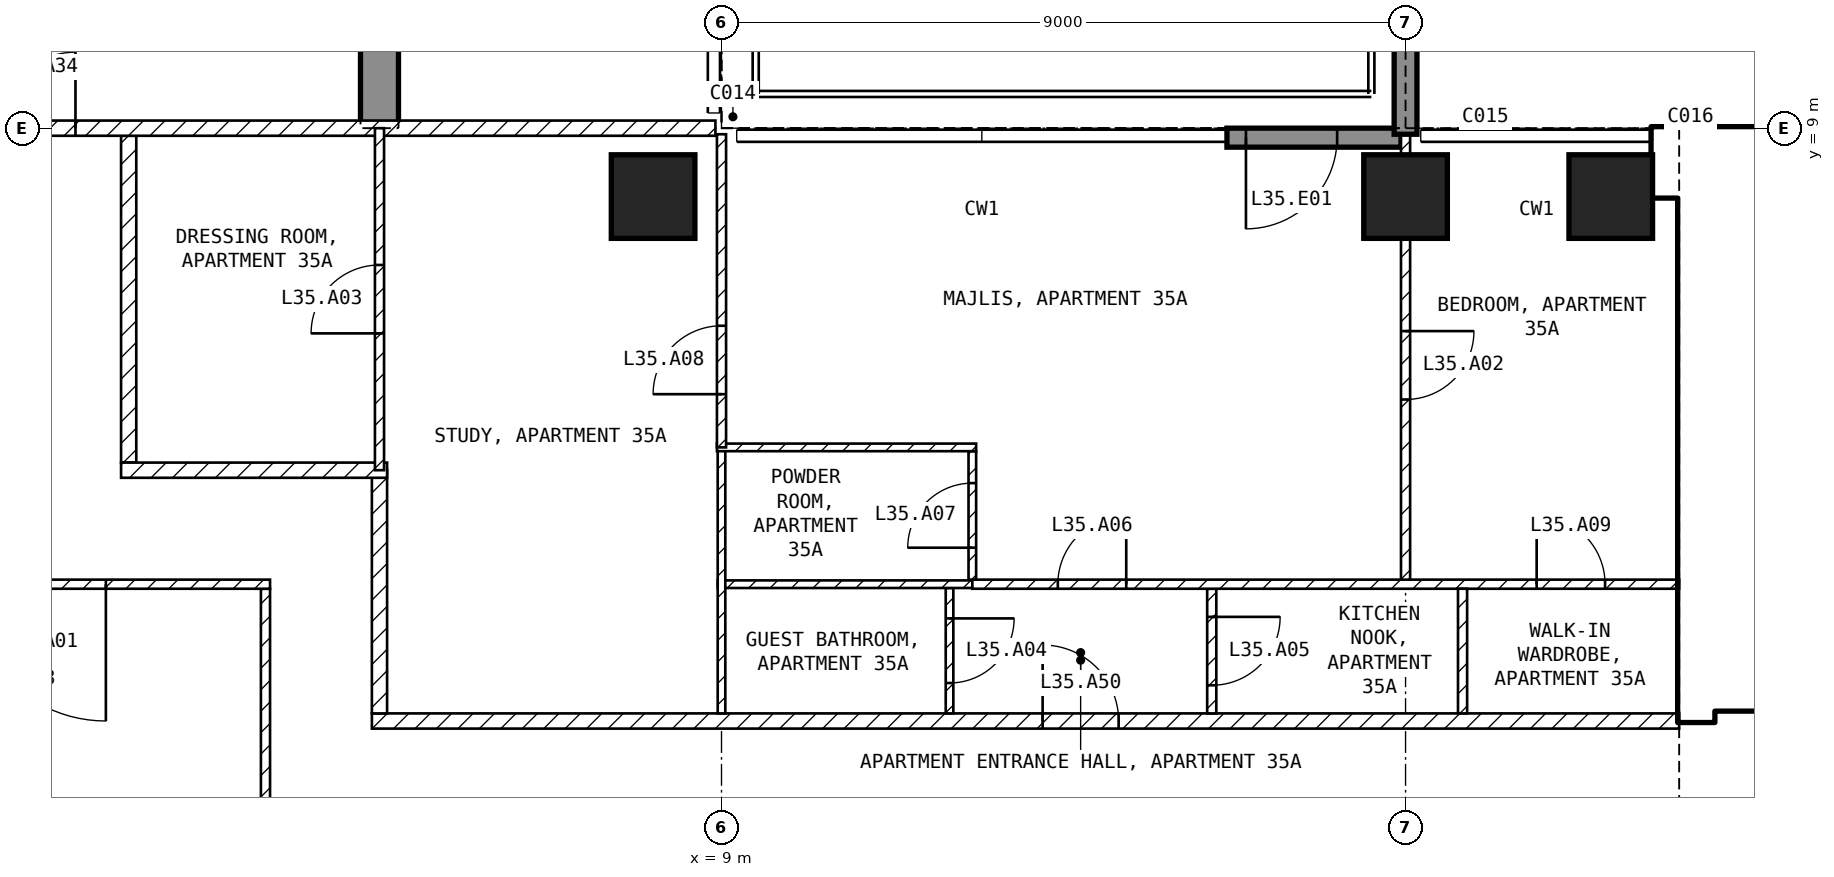
"""IFC4 building model, lengths in metres.
Left out: names, types, materials, properties, quantities, classifications, styles, units other than length and angle.
Written with IfcOpenShell. Run it as: python <this file> out.ifc"""

import sys

from ifc_helpers import new_model, si_unit, direction, frame, frame_2d, origin, origin_2d, place, context, subcontext, project, spatial, polyline, rectangle, outline, extrude, element, fill, save


model = new_model("IFC4")
c1 = context("Model", 3, precision=1e-05, world=origin(), true_north=direction((0.0, 1.0)))
c2 = subcontext(c1, "Body", "Model", "MODEL_VIEW")
j1 = project(units=[si_unit("LENGTHUNIT", "METRE"), si_unit("PLANEANGLEUNIT", "RADIAN")], contexts=[c1])
p1 = place(None, origin())
s1 = spatial("IfcSite", under=j1, at=p1, CompositionType="ELEMENT")
p2 = place(p1, origin())
s2 = spatial("IfcBuilding", under=s1, at=p2, CompositionType="ELEMENT")
p3 = place(p2, frame((0.0, 0.0, 144.4)))
s3 = spatial("IfcBuildingStorey", under=s2, at=p3, CompositionType="ELEMENT", Elevation=144.4)
for number, where, z_axis, x_axis in (
    (1, (8.1, 8.1, -0.25), (0.0, 0.0, 1.0), (1.0, 0.0, 0.0)),
    (2, (18.0, 8.1, -0.25), (0.0, 0.0, 1.0), (1.0, 0.0, 0.0)),
    (3, (20.7, 8.1, -0.25), (0.0, 0.0, 1.0), (1.0, 0.0, 0.0)),
):
    element("IfcColumn", number, at=place(p3, frame(where, z_axis=z_axis, x_axis=x_axis)), inside=s3, PredefinedType="COLUMN", context=c2, shape_type="SweptSolid", body=[
        extrude(rectangle(XDim=1.1, YDim=1.1, at=origin_2d()), origin(), (0.0, 0.0, 1.0), 3.5),
    ])
p4 = place(p3, frame((4.25, 9.0, -0.25), z_axis=(1.0, 0.0, 0.0), x_axis=(0.0, 1.0, 0.0)))
e4 = element("IfcWall", 4, at=p4, inside=s3, PredefinedType="SHEAR", context=c2, shape_type="SweptSolid", body=[
    extrude(outline(polyline([(0.0, 0.0), (2.1, 0.0), (2.1, 2.65), (4.5, 2.65), (4.5, 0.0), (9.9, 0.0), (9.9, 2.65), (12.3, 2.65), (12.3, 0.0), (16.55, 0.0), (16.55, 3.5), (0.0, 3.5), (0.0, 0.0)])), origin(), (0.0, 0.0, 1.0), 0.5),
])
p5 = place(p3, frame((17.94, 8.875, 0.0), z_axis=(0.0, 0.0, 1.0), x_axis=(-1.0, 0.0, 0.0)))
e5 = element("IfcWall", 5, at=p5, inside=s3, PredefinedType="SOLIDWALL", context=c2, shape_type="SweptSolid", body=[
    extrude(rectangle(XDim=2.29, YDim=0.25, at=frame_2d((1.145, 0.0))), origin(), (0.0, 0.0, 1.0), 3.25),
])
p6 = place(p5, frame((0.84, 0.0, 0.0)))
e6 = element("IfcOpeningElement", 6, at=p6, cuts=e5, PredefinedType="OPENING", context=c2, shape_type="SweptSolid", body=[
    extrude(rectangle(XDim=1.2, YDim=2.4, at=frame_2d((0.6, 1.2))), frame((0.0, 0.135, 0.0), z_axis=(0.0, -1.0, 0.0), x_axis=(1.0, 0.0, 0.0)), (0.0, 0.0, 1.0), 0.27),
])
p7 = place(p3, frame((18.0, 8.92, 0.0), z_axis=(0.0, 0.0, 1.0), x_axis=(0.0, 1.0, 0.0)))
e7 = element("IfcWall", 7, at=p7, inside=s3, PredefinedType="SOLIDWALL", context=c2, shape_type="SweptSolid", body=[
    extrude(rectangle(XDim=2.82, YDim=0.3, at=frame_2d((1.41, 0.0))), origin(), (0.0, 0.0, 1.0), 3.25),
])
p8 = place(p3, frame((21.25, 8.55, 0.0), z_axis=(0.0, 0.0, 1.0), x_axis=(1.0, 0.0, 0.0)))
e8 = element("IfcWall", 8, at=p8, inside=s3, PredefinedType="SHEAR", context=c2, shape_type="SweptSolid", body=[
    extrude(rectangle(XDim=8.2, YDim=0.9, at=frame_2d((4.1, 0.0))), origin(), (0.0, 0.0, 1.0), 3.25),
])
p9 = place(p3, frame((21.825, 1.2, 0.0), z_axis=(0.0, 0.0, 1.0), x_axis=(0.0, 1.0, 0.0)))
e9 = element("IfcWall", 9, at=p9, inside=s3, PredefinedType="SHEAR", context=c2, shape_type="SweptSolid", body=[
    extrude(rectangle(XDim=6.9, YDim=0.45, at=frame_2d((3.45, 0.0))), origin(), (0.0, 0.0, 1.0), 3.25),
])
p10 = place(p3, frame((22.05, 1.45, 0.0), z_axis=(0.0, 0.0, 1.0), x_axis=(1.0, 0.0, 0.0)))
e10 = element("IfcWall", 10, at=p10, inside=s3, PredefinedType="SOLIDWALL", context=c2, shape_type="SweptSolid", body=[
    extrude(rectangle(XDim=11.0, YDim=0.2, at=frame_2d((5.5, 0.0))), origin(), (0.0, 0.0, 1.0), 3.25),
])
p11 = place(p10, frame((0.75, 0.0, 0.0)))
e11 = element("IfcOpeningElement", 11, at=p11, cuts=e10, PredefinedType="OPENING", context=c2, shape_type="SweptSolid", body=[
    extrude(rectangle(XDim=1.0, YDim=2.1, at=frame_2d((0.5, 1.05))), frame((0.0, 0.11, 0.0), z_axis=(0.0, -1.0, 0.0), x_axis=(1.0, 0.0, 0.0)), (0.0, 0.0, 1.0), 0.22),
])
p12 = place(p10, frame((3.25, 0.0, 0.0)))
e12 = element("IfcOpeningElement", 12, at=p12, cuts=e10, PredefinedType="OPENING", context=c2, shape_type="SweptSolid", body=[
    extrude(rectangle(XDim=1.0, YDim=2.1, at=frame_2d((0.5, 1.05))), frame((0.0, 0.11, 0.0), z_axis=(0.0, -1.0, 0.0), x_axis=(1.0, 0.0, 0.0)), (0.0, 0.0, 1.0), 0.22),
])
p13 = place(p10, frame((9.075, 0.0, 0.0)))
e13 = element("IfcOpeningElement", 13, at=p13, cuts=e10, PredefinedType="OPENING", context=c2, shape_type="SweptSolid", body=[
    extrude(rectangle(XDim=0.9, YDim=2.1, at=frame_2d((0.45, 1.05))), frame((0.0, 0.11, 0.0), z_axis=(0.0, -1.0, 0.0), x_axis=(1.0, 0.0, 0.0)), (0.0, 0.0, 1.0), 0.22),
])
p14 = place(p3, frame((22.05, 5.15, 0.0), z_axis=(0.0, 0.0, 1.0), x_axis=(1.0, 0.0, 0.0)))
e14 = element("IfcWall", 14, at=p14, inside=s3, PredefinedType="SOLIDWALL", context=c2, shape_type="SweptSolid", body=[
    extrude(rectangle(XDim=6.3, YDim=0.2, at=frame_2d((3.15, 0.0))), origin(), (0.0, 0.0, 1.0), 3.25),
])
p15 = place(p14, frame((0.2, 0.0, 0.0)))
e15 = element("IfcOpeningElement", 15, at=p15, cuts=e14, PredefinedType="OPENING", context=c2, shape_type="SweptSolid", body=[
    extrude(rectangle(XDim=1.0, YDim=2.1, at=frame_2d((0.5, 1.05))), frame((0.0, 0.11, 0.0), z_axis=(0.0, -1.0, 0.0), x_axis=(1.0, 0.0, 0.0)), (0.0, 0.0, 1.0), 0.22),
])
p16 = place(p3, frame((3.0, -2.94, 0.0), z_axis=(0.0, 0.0, 1.0), x_axis=(0.0, 1.0, 0.0)))
e16 = element("IfcWall", 16, at=p16, inside=s3, PredefinedType="PARTITIONING", context=c2, shape_type="SweptSolid", body=[
    extrude(rectangle(XDim=5.88, YDim=0.12, at=frame_2d((2.94, 0.0))), origin(), (0.0, 0.0, 1.0), 3.25),
])
p17 = place(p3, frame((3.06, 3.0, 0.0), z_axis=(0.0, 0.0, 1.0), x_axis=(-1.0, 0.0, 0.0)))
e17 = element("IfcWall", 17, at=p17, inside=s3, PredefinedType="PARTITIONING", context=c2, shape_type="SweptSolid", body=[
    extrude(rectangle(XDim=6.12, YDim=0.12, at=frame_2d((3.06, 0.0))), origin(), (0.0, 0.0, 1.0), 3.25),
])
p18 = place(p17, frame((2.16, 0.0, 0.0)))
e18 = element("IfcOpeningElement", 18, at=p18, cuts=e17, PredefinedType="OPENING", context=c2, shape_type="SweptSolid", body=[
    extrude(rectangle(XDim=1.8, YDim=2.1, at=frame_2d((0.9, 1.05))), frame((0.0, 0.07, 0.0), z_axis=(0.0, -1.0, 0.0), x_axis=(1.0, 0.0, 0.0)), (0.0, 0.0, 1.0), 0.14),
])
p19 = place(p3, frame((4.4, 1.2, 0.0), z_axis=(0.0, 0.0, 1.0), x_axis=(1.0, 0.0, 0.0)))
e19 = element("IfcWall", 19, at=p19, inside=s3, PredefinedType="PARTITIONING", context=c2, shape_type="SweptSolid", body=[
    extrude(rectangle(XDim=17.2, YDim=0.2, at=frame_2d((8.6, 0.0))), origin(), (0.0, 0.0, 1.0), 3.25),
])
p20 = place(p19, frame((8.825, 0.0, 0.0)))
e20 = element("IfcOpeningElement", 20, at=p20, cuts=e19, PredefinedType="OPENING", context=c2, shape_type="SweptSolid", body=[
    extrude(rectangle(XDim=1.0, YDim=2.1, at=frame_2d((0.5, 1.05))), frame((0.0, 0.11, 0.0), z_axis=(0.0, -1.0, 0.0), x_axis=(1.0, 0.0, 0.0)), (0.0, 0.0, 1.0), 0.22),
])
p21 = place(p3, frame((4.5, 4.5, 0.0), z_axis=(0.0, 0.0, 1.0), x_axis=(0.0, -1.0, 0.0)))
e21 = element("IfcWall", 21, at=p21, inside=s3, PredefinedType="PARTITIONING", context=c2, shape_type="SweptSolid", body=[
    extrude(rectangle(XDim=3.2, YDim=0.2, at=frame_2d((1.6, 0.0))), origin(), (0.0, 0.0, 1.0), 3.25),
])
p22 = place(p3, frame((1.2, 8.9, 0.0), z_axis=(0.0, 0.0, 1.0), x_axis=(0.0, -1.0, 0.0)))
e22 = element("IfcWall", 22, at=p22, inside=s3, PredefinedType="PARTITIONING", context=c2, shape_type="SweptSolid", body=[
    extrude(rectangle(XDim=4.3, YDim=0.2, at=frame_2d((2.15, 0.0))), origin(), (0.0, 0.0, 1.0), 3.25),
])
p23 = place(p3, frame((1.1, 4.5, 0.0), z_axis=(0.0, 0.0, 1.0), x_axis=(1.0, 0.0, 0.0)))
e23 = element("IfcWall", 23, at=p23, inside=s3, PredefinedType="PARTITIONING", context=c2, shape_type="SweptSolid", body=[
    extrude(rectangle(XDim=3.5, YDim=0.2, at=frame_2d((1.75, 0.0))), origin(), (0.0, 0.0, 1.0), 3.25),
])
p24 = place(p3, frame((-8.92, 9.0, 0.0), z_axis=(0.0, 0.0, 1.0), x_axis=(1.0, 0.0, 0.0)))
e24 = element("IfcWall", 24, at=p24, inside=s3, PredefinedType="PARTITIONING", context=c2, shape_type="SweptSolid", body=[
    extrude(rectangle(XDim=17.84, YDim=0.2, at=frame_2d((8.92, 0.0))), origin(), (0.0, 0.0, 1.0), 3.25),
])
p25 = place(p24, frame((8.42, 0.0, 0.0)))
e25 = element("IfcOpeningElement", 25, at=p25, cuts=e24, PredefinedType="OPENING", context=c2, shape_type="SweptSolid", body=[
    extrude(rectangle(XDim=1.0, YDim=2.1, at=frame_2d((0.5, 1.05))), frame((0.0, 0.11, 0.0), z_axis=(0.0, -1.0, 0.0), x_axis=(1.0, 0.0, 0.0)), (0.0, 0.0, 1.0), 0.22),
])
p26 = place(p3, frame((12.0, 2.95, 0.0), z_axis=(0.0, 0.0, 1.0), x_axis=(0.0, -1.0, 0.0)))
e26 = element("IfcWall", 26, at=p26, inside=s3, PredefinedType="PARTITIONING", context=c2, shape_type="SweptSolid", body=[
    extrude(rectangle(XDim=1.65, YDim=0.1, at=frame_2d((0.825, 0.0))), origin(), (0.0, 0.0, 1.0), 3.25),
])
p27 = place(p26, frame((0.4, 0.0, 0.0)))
e27 = element("IfcOpeningElement", 27, at=p27, cuts=e26, PredefinedType="OPENING", context=c2, shape_type="SweptSolid", body=[
    extrude(rectangle(XDim=0.85, YDim=2.1, at=frame_2d((0.425, 1.05))), frame((0.0, 0.06, 0.0), z_axis=(0.0, -1.0, 0.0), x_axis=(1.0, 0.0, 0.0)), (0.0, 0.0, 1.0), 0.12),
])
p28 = place(p3, frame((8.95, 3.0, 0.0), z_axis=(0.0, 0.0, 1.0), x_axis=(1.0, 0.0, 0.0)))
e28 = element("IfcWall", 28, at=p28, inside=s3, PredefinedType="PARTITIONING", context=c2, shape_type="SweptSolid", body=[
    extrude(rectangle(XDim=3.35, YDim=0.1, at=frame_2d((1.675, 0.0))), origin(), (0.0, 0.0, 1.0), 3.25),
])
p29 = place(p3, frame((9.0, 1.3, 0.0), z_axis=(0.0, 0.0, 1.0), x_axis=(0.0, 1.0, 0.0)))
e29 = element("IfcWall", 29, at=p29, inside=s3, PredefinedType="PARTITIONING", context=c2, shape_type="SweptSolid", body=[
    extrude(rectangle(XDim=3.5, YDim=0.1, at=frame_2d((1.75, 0.0))), origin(), (0.0, 0.0, 1.0), 3.25),
])
p30 = place(p3, frame((15.45, 2.94, 0.0), z_axis=(0.0, 0.0, 1.0), x_axis=(0.0, -1.0, 0.0)))
e30 = element("IfcWall", 30, at=p30, inside=s3, PredefinedType="PARTITIONING", context=c2, shape_type="SweptSolid", body=[
    extrude(rectangle(XDim=1.64, YDim=0.12, at=frame_2d((0.82, 0.0))), origin(), (0.0, 0.0, 1.0), 3.25),
])
p31 = place(p30, frame((0.37, 0.0, 0.0)))
e31 = element("IfcOpeningElement", 31, at=p31, cuts=e30, PredefinedType="OPENING", context=c2, shape_type="SweptSolid", body=[
    extrude(rectangle(XDim=0.9, YDim=2.1, at=frame_2d((0.45, 1.05))), frame((0.0, 0.07, 0.0), z_axis=(0.0, -1.0, 0.0), x_axis=(1.0, 0.0, 0.0)), (0.0, 0.0, 1.0), 0.14),
])
p32 = place(p3, frame((12.3, 3.0, 0.0), z_axis=(0.0, 0.0, 1.0), x_axis=(1.0, 0.0, 0.0)))
e32 = element("IfcWall", 32, at=p32, inside=s3, PredefinedType="PARTITIONING", context=c2, shape_type="SweptSolid", body=[
    extrude(rectangle(XDim=9.3, YDim=0.12, at=frame_2d((4.65, 0.0))), origin(), (0.0, 0.0, 1.0), 3.25),
])
p33 = place(p32, frame((1.125, 0.0, 0.0)))
e33 = element("IfcOpeningElement", 33, at=p33, cuts=e32, PredefinedType="OPENING", context=c2, shape_type="SweptSolid", body=[
    extrude(rectangle(XDim=0.9, YDim=2.1, at=frame_2d((0.45, 1.05))), frame((0.0, 0.07, 0.0), z_axis=(0.0, -1.0, 0.0), x_axis=(1.0, 0.0, 0.0)), (0.0, 0.0, 1.0), 0.14),
])
p34 = place(p32, frame((7.425, 0.0, 0.0)))
e34 = element("IfcOpeningElement", 34, at=p34, cuts=e32, PredefinedType="OPENING", context=c2, shape_type="SweptSolid", body=[
    extrude(rectangle(XDim=0.9, YDim=2.1, at=frame_2d((0.45, 1.05))), frame((0.0, 0.07, 0.0), z_axis=(0.0, -1.0, 0.0), x_axis=(1.0, 0.0, 0.0)), (0.0, 0.0, 1.0), 0.14),
])
p35 = place(p3, frame((18.75, 2.94, 0.0), z_axis=(0.0, 0.0, 1.0), x_axis=(0.0, -1.0, 0.0)))
e35 = element("IfcWall", 35, at=p35, inside=s3, PredefinedType="PARTITIONING", context=c2, shape_type="SweptSolid", body=[
    extrude(rectangle(XDim=1.64, YDim=0.12, at=frame_2d((0.82, 0.0))), origin(), (0.0, 0.0, 1.0), 3.25),
])
p36 = place(p3, frame((12.3, 3.06, 0.0), z_axis=(0.0, 0.0, 1.0), x_axis=(0.0, 1.0, 0.0)))
e36 = element("IfcWall", 36, at=p36, inside=s3, PredefinedType="PARTITIONING", context=c2, shape_type="SweptSolid", body=[
    extrude(rectangle(XDim=1.69, YDim=0.1, at=frame_2d((0.845, 0.0))), origin(), (0.0, 0.0, 1.0), 3.25),
])
p37 = place(p36, frame((0.42, 0.0, 0.0)))
e37 = element("IfcOpeningElement", 37, at=p37, cuts=e36, PredefinedType="OPENING", context=c2, shape_type="SweptSolid", body=[
    extrude(rectangle(XDim=0.85, YDim=2.1, at=frame_2d((0.425, 1.05))), frame((0.0, 0.06, 0.0), z_axis=(0.0, -1.0, 0.0), x_axis=(1.0, 0.0, 0.0)), (0.0, 0.0, 1.0), 0.12),
])
p38 = place(p3, frame((12.35, 4.8, 0.0), z_axis=(0.0, 0.0, 1.0), x_axis=(-1.0, 0.0, 0.0)))
e38 = element("IfcWall", 38, at=p38, inside=s3, PredefinedType="PARTITIONING", context=c2, shape_type="SweptSolid", body=[
    extrude(rectangle(XDim=3.41, YDim=0.1, at=frame_2d((1.705, 0.0))), origin(), (0.0, 0.0, 1.0), 3.25),
])
p39 = place(p3, frame((18.0, 8.92, 0.0), z_axis=(0.0, 0.0, 1.0), x_axis=(0.0, -1.0, 0.0)))
e39 = element("IfcWall", 39, at=p39, inside=s3, PredefinedType="PARTITIONING", context=c2, shape_type="SweptSolid", body=[
    extrude(rectangle(XDim=5.86, YDim=0.12, at=frame_2d((2.93, 0.0))), origin(), (0.0, 0.0, 1.0), 2.414),
])
p40 = place(p39, frame((2.59, 0.0, 0.0)))
e40 = element("IfcOpeningElement", 40, at=p40, cuts=e39, PredefinedType="OPENING", context=c2, shape_type="SweptSolid", body=[
    extrude(rectangle(XDim=0.9, YDim=2.1, at=frame_2d((0.45, 1.05))), frame((0.0, 0.07, 0.0), z_axis=(0.0, -1.0, 0.0), x_axis=(1.0, 0.0, 0.0)), (0.0, 0.0, 1.0), 0.14),
])
p41 = place(p3, frame((9.0, 4.8, 0.0), z_axis=(0.0, 0.0, 1.0), x_axis=(0.0, 1.0, 0.0)))
e41 = element("IfcWall", 41, at=p41, inside=s3, PredefinedType="PARTITIONING", context=c2, shape_type="SweptSolid", body=[
    extrude(rectangle(XDim=4.12, YDim=0.12, at=frame_2d((2.06, 0.0))), origin(), (0.0, 0.0, 1.0), 3.25),
])
p42 = place(p41, frame((0.7, 0.0, 0.0)))
e42 = element("IfcOpeningElement", 42, at=p42, cuts=e41, PredefinedType="OPENING", context=c2, shape_type="SweptSolid", body=[
    extrude(rectangle(XDim=0.9, YDim=2.1, at=frame_2d((0.45, 1.05))), frame((0.0, 0.07, 0.0), z_axis=(0.0, -1.0, 0.0), x_axis=(1.0, 0.0, 0.0)), (0.0, 0.0, 1.0), 0.14),
])
p43 = place(p3, frame((4.5, 4.5, 0.0), z_axis=(0.0, 0.0, 1.0), x_axis=(0.0, 1.0, 0.0)))
e43 = element("IfcWall", 43, at=p43, inside=s3, PredefinedType="PARTITIONING", context=c2, shape_type="SweptSolid", body=[
    extrude(rectangle(XDim=4.5, YDim=0.12, at=frame_2d((2.25, 0.0))), origin(), (0.0, 0.0, 1.0), 3.25),
])
p44 = place(p43, frame((1.8, 0.0, 0.0)))
e44 = element("IfcOpeningElement", 44, at=p44, cuts=e43, PredefinedType="OPENING", context=c2, shape_type="SweptSolid", body=[
    extrude(rectangle(XDim=0.9, YDim=2.1, at=frame_2d((0.45, 1.05))), frame((0.0, 0.07, 0.0), z_axis=(0.0, -1.0, 0.0), x_axis=(1.0, 0.0, 0.0)), (0.0, 0.0, 1.0), 0.14),
])
p45 = place(p6, origin())
e45 = element("IfcDoor", 45, at=p45, inside=s3, OperationType="SINGLE_SWING_RIGHT", PredefinedType="DOOR", context=c2, shape_type="SweptSolid", body=[
    extrude(rectangle(XDim=1.2, YDim=2.4, at=frame_2d((0.6, 1.2))), frame((0.0, 0.025, 0.0), z_axis=(0.0, -1.0, 0.0), x_axis=(1.0, 0.0, 0.0)), (0.0, 0.0, 1.0), 0.05),
])
fill(e6, e45)
p46 = place(p15, origin())
e46 = element("IfcDoor", 46, at=p46, inside=s3, OperationType="SINGLE_SWING_LEFT", PredefinedType="DOOR", context=c2, shape_type="SweptSolid", body=[
    extrude(rectangle(XDim=1.0, YDim=2.1, at=frame_2d((0.5, 1.05))), frame((0.0, 0.025, 0.0), z_axis=(0.0, -1.0, 0.0), x_axis=(1.0, 0.0, 0.0)), (0.0, 0.0, 1.0), 0.05),
])
fill(e15, e46)
p47 = place(p18, origin())
e47 = element("IfcDoor", 47, at=p47, inside=s3, OperationType="SINGLE_SWING_LEFT", PredefinedType="DOOR", context=c2, shape_type="SweptSolid", body=[
    extrude(rectangle(XDim=1.8, YDim=2.1, at=frame_2d((0.9, 1.05))), frame((0.0, 0.025, 0.0), z_axis=(0.0, -1.0, 0.0), x_axis=(1.0, 0.0, 0.0)), (0.0, 0.0, 1.0), 0.05),
])
fill(e18, e47)
p48 = place(p40, origin())
e48 = element("IfcDoor", 48, at=p48, inside=s3, OperationType="SINGLE_SWING_LEFT", PredefinedType="DOOR", context=c2, shape_type="SweptSolid", body=[
    extrude(rectangle(XDim=0.9, YDim=2.1, at=frame_2d((0.45, 1.05))), frame((0.0, 0.025, 0.0), z_axis=(0.0, -1.0, 0.0), x_axis=(1.0, 0.0, 0.0)), (0.0, 0.0, 1.0), 0.05),
])
fill(e40, e48)
p49 = place(p44, origin())
e49 = element("IfcDoor", 49, at=p49, inside=s3, OperationType="SINGLE_SWING_LEFT", PredefinedType="DOOR", context=c2, shape_type="SweptSolid", body=[
    extrude(rectangle(XDim=0.9, YDim=2.1, at=frame_2d((0.45, 1.05))), frame((0.0, 0.025, 0.0), z_axis=(0.0, -1.0, 0.0), x_axis=(1.0, 0.0, 0.0)), (0.0, 0.0, 1.0), 0.05),
])
fill(e44, e49)
p50 = place(p27, origin())
e50 = element("IfcDoor", 50, at=p50, inside=s3, OperationType="SINGLE_SWING_LEFT", PredefinedType="DOOR", context=c2, shape_type="SweptSolid", body=[
    extrude(rectangle(XDim=0.85, YDim=2.1, at=frame_2d((0.425, 1.05))), frame((0.0, 0.025, 0.0), z_axis=(0.0, -1.0, 0.0), x_axis=(1.0, 0.0, 0.0)), (0.0, 0.0, 1.0), 0.05),
])
fill(e27, e50)
p51 = place(p31, origin())
e51 = element("IfcDoor", 51, at=p51, inside=s3, OperationType="SINGLE_SWING_LEFT", PredefinedType="DOOR", context=c2, shape_type="SweptSolid", body=[
    extrude(rectangle(XDim=0.9, YDim=2.1, at=frame_2d((0.45, 1.05))), frame((0.0, 0.025, 0.0), z_axis=(0.0, -1.0, 0.0), x_axis=(1.0, 0.0, 0.0)), (0.0, 0.0, 1.0), 0.05),
])
fill(e31, e51)
p52 = place(p33, origin())
e52 = element("IfcDoor", 52, at=p52, inside=s3, OperationType="SINGLE_SWING_RIGHT", PredefinedType="DOOR", context=c2, shape_type="SweptSolid", body=[
    extrude(rectangle(XDim=0.9, YDim=2.1, at=frame_2d((0.45, 1.05))), frame((0.0, 0.025, 0.0), z_axis=(0.0, -1.0, 0.0), x_axis=(1.0, 0.0, 0.0)), (0.0, 0.0, 1.0), 0.05),
])
fill(e33, e52)
p53 = place(p37, origin())
e53 = element("IfcDoor", 53, at=p53, inside=s3, OperationType="SINGLE_SWING_LEFT", PredefinedType="DOOR", context=c2, shape_type="SweptSolid", body=[
    extrude(rectangle(XDim=0.85, YDim=2.1, at=frame_2d((0.425, 1.05))), frame((0.0, 0.025, 0.0), z_axis=(0.0, -1.0, 0.0), x_axis=(1.0, 0.0, 0.0)), (0.0, 0.0, 1.0), 0.05),
])
fill(e37, e53)
p54 = place(p42, origin())
e54 = element("IfcDoor", 54, at=p54, inside=s3, OperationType="SINGLE_SWING_LEFT", PredefinedType="DOOR", context=c2, shape_type="SweptSolid", body=[
    extrude(rectangle(XDim=0.9, YDim=2.1, at=frame_2d((0.45, 1.05))), frame((0.0, 0.025, 0.0), z_axis=(0.0, -1.0, 0.0), x_axis=(1.0, 0.0, 0.0)), (0.0, 0.0, 1.0), 0.05),
])
fill(e42, e54)
p55 = place(p34, origin())
e55 = element("IfcDoor", 55, at=p55, inside=s3, OperationType="SINGLE_SWING_LEFT", PredefinedType="DOOR", context=c2, shape_type="SweptSolid", body=[
    extrude(rectangle(XDim=0.9, YDim=2.1, at=frame_2d((0.45, 1.05))), frame((0.0, 0.025, 0.0), z_axis=(0.0, -1.0, 0.0), x_axis=(1.0, 0.0, 0.0)), (0.0, 0.0, 1.0), 0.05),
])
fill(e34, e55)
p56 = place(p25, origin())
e56 = element("IfcDoor", 56, at=p56, inside=s3, OperationType="SINGLE_SWING_RIGHT", PredefinedType="DOOR", context=c2, shape_type="SweptSolid", body=[
    extrude(rectangle(XDim=1.0, YDim=2.1, at=frame_2d((0.5, 1.05))), frame((0.0, 0.025, 0.0), z_axis=(0.0, -1.0, 0.0), x_axis=(1.0, 0.0, 0.0)), (0.0, 0.0, 1.0), 0.05),
])
fill(e25, e56)
p57 = place(p20, origin())
e57 = element("IfcDoor", 57, at=p57, inside=s3, OperationType="SINGLE_SWING_LEFT", PredefinedType="DOOR", context=c2, shape_type="SweptSolid", body=[
    extrude(rectangle(XDim=1.0, YDim=2.1, at=frame_2d((0.5, 1.05))), frame((0.0, 0.025, 0.0), z_axis=(0.0, -1.0, 0.0), x_axis=(1.0, 0.0, 0.0)), (0.0, 0.0, 1.0), 0.05),
])
fill(e20, e57)
save(model, sys.argv[1])
